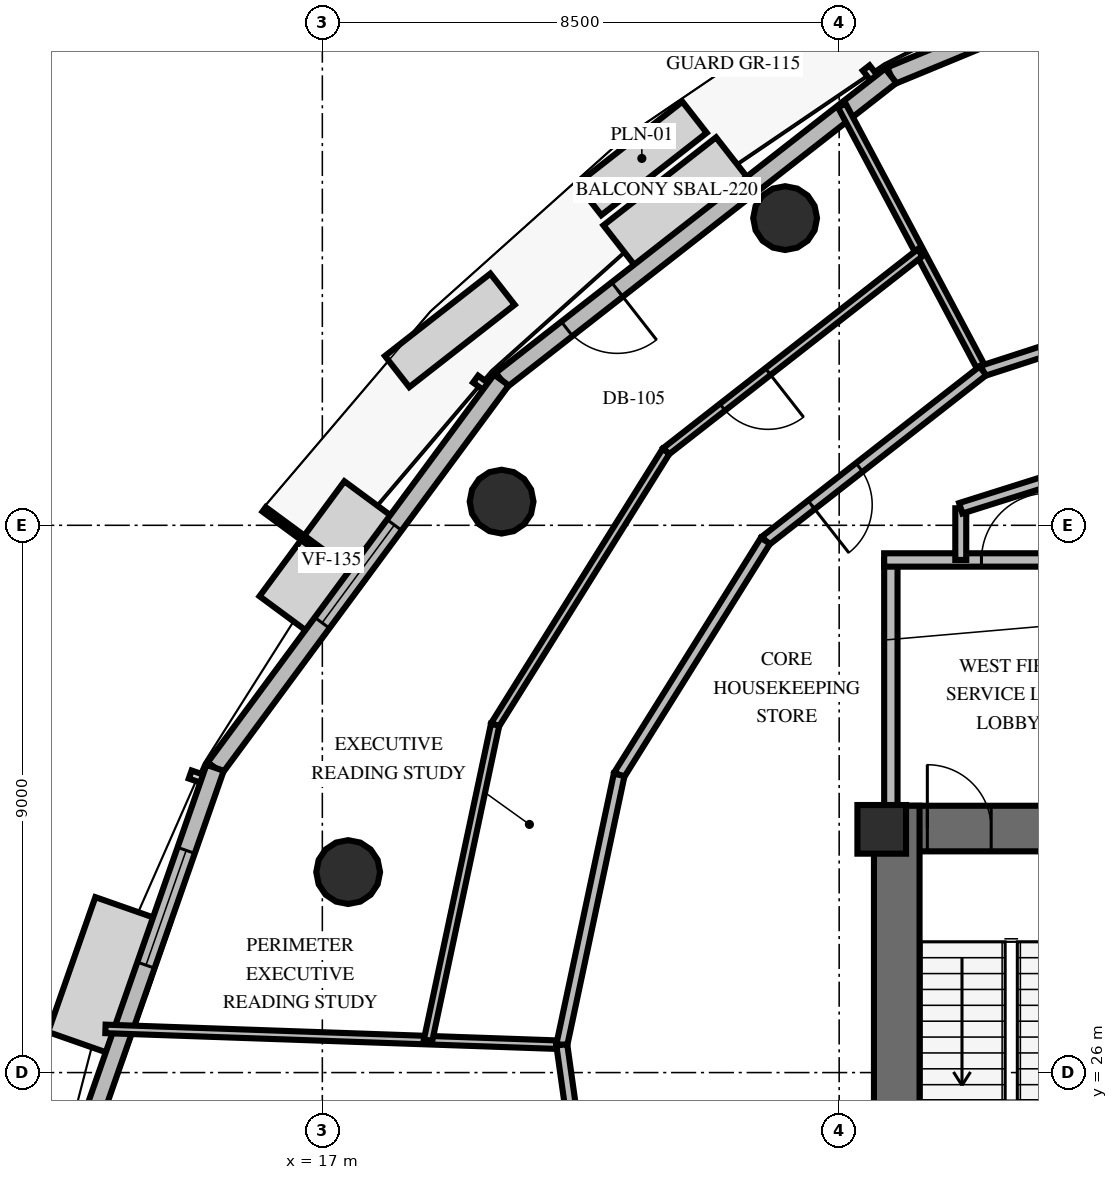
"""IFC4 building model, lengths in metres.
Left out: names, types, materials, properties, quantities, classifications, styles, units other than length and angle.
Written with IfcOpenShell. Run it as: python <this file> out.ifc"""

import sys

from ifc_helpers import new_model, si_unit, direction, frame, frame_2d, origin, origin_2d, place, context, subcontext, project, spatial, rectangle, circle, extrude, element, fill, save


model = new_model("IFC4")
c1 = context("Model", 3, precision=1e-05, world=origin(), true_north=direction((0.0, 1.0)))
c2 = subcontext(c1, "Body", "Model", "MODEL_VIEW")
j1 = project(units=[si_unit("LENGTHUNIT", "METRE"), si_unit("PLANEANGLEUNIT", "RADIAN")], contexts=[c1])
p1 = place(None, origin())
s1 = spatial("IfcSite", under=j1, at=p1, CompositionType="ELEMENT")
p2 = place(p1, origin())
s2 = spatial("IfcBuilding", under=s1, at=p2, CompositionType="ELEMENT")
p3 = place(p2, frame((0.0, 0.0, 191.6)))
s3 = spatial("IfcBuildingStorey", under=s2, at=p3, CompositionType="ELEMENT", Elevation=191.6)
p4 = place(p3, frame((26.072, 30.013, 0.0), z_axis=(0.0, 0.0, 1.0), x_axis=(1.0, 0.0, 0.0)))
e1 = element("IfcWall", 1, at=p4, inside=s3, PredefinedType="SHEAR", context=c2, shape_type="SweptSolid", body=[
    extrude(rectangle(XDim=15.866, YDim=0.75, at=frame_2d((7.933, 0.0))), origin(), (0.0, 0.0, 1.0), 3.6),
])
p5 = place(p4, frame((0.878, 0.0, 0.0)))
e2 = element("IfcOpeningElement", 2, at=p5, cuts=e1, PredefinedType="OPENING", context=c2, shape_type="SweptSolid", body=[
    extrude(rectangle(XDim=1.05, YDim=2.15, at=frame_2d((0.525, 1.075))), frame((0.0, 0.385, 0.0), z_axis=(0.0, -1.0, 0.0), x_axis=(1.0, 0.0, 0.0)), (0.0, 0.0, 1.0), 0.77),
])
p6 = place(p4, frame((13.928, 0.0, 0.0)))
e3 = element("IfcOpeningElement", 3, at=p6, cuts=e1, PredefinedType="OPENING", context=c2, shape_type="SweptSolid", body=[
    extrude(rectangle(XDim=1.05, YDim=2.15, at=frame_2d((0.525, 1.075))), frame((0.0, 0.385, 0.0), z_axis=(0.0, -1.0, 0.0), x_axis=(1.0, 0.0, 0.0)), (0.0, 0.0, 1.0), 0.77),
])
p7 = place(p4, frame((7.378, 0.0, 0.0)))
e4 = element("IfcOpeningElement", 4, at=p7, cuts=e1, PredefinedType="OPENING", context=c2, shape_type="SweptSolid", body=[
    extrude(rectangle(XDim=1.1, YDim=2.15, at=frame_2d((0.55, 1.075))), frame((0.0, 0.385, 0.0), z_axis=(0.0, -1.0, 0.0), x_axis=(1.0, 0.0, 0.0)), (0.0, 0.0, 1.0), 0.77),
])
p8 = place(p3, frame((26.447, 19.812, 0.0), z_axis=(0.0, 0.0, 1.0), x_axis=(0.0, 1.0, 0.0)))
e5 = element("IfcWall", 5, at=p8, inside=s3, PredefinedType="SHEAR", context=c2, shape_type="SweptSolid", body=[
    extrude(rectangle(XDim=10.576, YDim=0.75, at=frame_2d((5.288, 0.0))), origin(), (0.0, 0.0, 1.0), 3.6),
])
p9 = place(p3, frame((26.2, 30.0, 0.0), z_axis=(0.0, 0.0, 1.0), x_axis=(1.0, 0.0, 0.0)))
e6 = element("IfcColumn", 6, at=p9, inside=s3, PredefinedType="PILASTER", context=c2, shape_type="SweptSolid", body=[
    extrude(rectangle(XDim=0.8, YDim=0.8, at=origin_2d()), origin(), (0.0, 0.0, 1.0), 3.6),
])
for number, where, z_axis, x_axis in (
    (7, (24.611, 40.052, 0.0), (0.0, 0.0, 1.0), (1.0, 0.0, 0.0)),
    (8, (19.948, 35.389, 0.0), (0.0, 0.0, 1.0), (1.0, 0.0, 0.0)),
    (9, (17.425, 29.297, 0.0), (0.0, 0.0, 1.0), (1.0, 0.0, 0.0)),
):
    element("IfcColumn", number, at=place(p3, frame(where, z_axis=z_axis, x_axis=x_axis)), inside=s3, PredefinedType="COLUMN", context=c2, shape_type="SweptSolid", body=[
        extrude(circle(Radius=0.525, at=origin_2d()), origin(), (0.0, 0.0, 1.0), 3.6),
    ])
p10 = place(p3, frame((33.676, 45.419, 0.0), z_axis=(0.0, 0.0, 1.0), x_axis=(-0.924266151276, -0.381748715264, 0.0)))
e10 = element("IfcWall", 10, at=p10, inside=s3, PredefinedType="SOLIDWALL", context=c2, shape_type="SweptSolid", body=[
    extrude(rectangle(XDim=7.927, YDim=0.3, at=frame_2d((3.963, 0.0))), origin(), (0.0, 0.0, 1.0), 2.66),
])
p11 = place(p10, frame((2.964, 0.0, 0.8)))
e11 = element("IfcOpeningElement", 11, at=p11, cuts=e10, PredefinedType="OPENING", context=c2, shape_type="SweptSolid", body=[
    extrude(rectangle(XDim=2.0, YDim=1.85, at=frame_2d((1.0, 0.925))), frame((0.0, 0.16, 0.0), z_axis=(0.0, -1.0, 0.0), x_axis=(1.0, 0.0, 0.0)), (0.0, 0.0, 1.0), 0.32),
])
p12 = place(p3, frame((26.349, 42.393, 0.0), z_axis=(0.0, 0.0, 1.0), x_axis=(-0.788009343807, -0.615663279783, 0.0)))
e12 = element("IfcWall", 12, at=p12, inside=s3, PredefinedType="SOLIDWALL", context=c2, shape_type="SweptSolid", body=[
    extrude(rectangle(XDim=8.127, YDim=0.3, at=frame_2d((4.063, 0.0))), origin(), (0.0, 0.0, 1.0), 2.66),
])
p13 = place(p12, frame((5.71, 0.0, 0.0)))
e13 = element("IfcOpeningElement", 13, at=p13, cuts=e12, PredefinedType="OPENING", context=c2, shape_type="SweptSolid", body=[
    extrude(rectangle(XDim=1.05, YDim=2.15, at=frame_2d((0.525, 1.075))), frame((0.0, 0.16, 0.0), z_axis=(0.0, -1.0, 0.0), x_axis=(1.0, 0.0, 0.0)), (0.0, 0.0, 1.0), 0.32),
])
p14 = place(p3, frame((19.945, 37.389, 0.0), z_axis=(0.0, 0.0, 1.0), x_axis=(-0.594010832638, -0.804457040934, 0.0)))
e14 = element("IfcWall", 14, at=p14, inside=s3, PredefinedType="SOLIDWALL", context=c2, shape_type="SweptSolid", body=[
    extrude(rectangle(XDim=7.927, YDim=0.3, at=frame_2d((3.963, 0.0))), origin(), (0.0, 0.0, 1.0), 2.66),
])
p15 = place(p14, frame((2.964, 0.0, 0.8)))
e15 = element("IfcOpeningElement", 15, at=p15, cuts=e14, PredefinedType="OPENING", context=c2, shape_type="SweptSolid", body=[
    extrude(rectangle(XDim=2.0, YDim=1.85, at=frame_2d((1.0, 0.925))), frame((0.0, 0.16, 0.0), z_axis=(0.0, -1.0, 0.0), x_axis=(1.0, 0.0, 0.0)), (0.0, 0.0, 1.0), 0.32),
])
p16 = place(p3, frame((15.236, 31.012, 0.0), z_axis=(0.0, 0.0, 1.0), x_axis=(-0.330587092265, -0.943775489419, 0.0)))
e16 = element("IfcWall", 16, at=p16, inside=s3, PredefinedType="SOLIDWALL", context=c2, shape_type="SweptSolid", body=[
    extrude(rectangle(XDim=7.398, YDim=0.3, at=frame_2d((3.699, 0.0))), origin(), (0.0, 0.0, 1.0), 2.66),
])
p17 = place(p16, frame((1.439, 0.0, 0.8)))
e17 = element("IfcOpeningElement", 17, at=p17, cuts=e16, PredefinedType="OPENING", context=c2, shape_type="SweptSolid", body=[
    extrude(rectangle(XDim=2.0, YDim=1.85, at=frame_2d((1.0, 0.925))), frame((0.0, 0.16, 0.0), z_axis=(0.0, -1.0, 0.0), x_axis=(1.0, 0.0, 0.0)), (0.0, 0.0, 1.0), 0.32),
])
p18 = place(p3, frame((26.35, 30.05, 0.0), z_axis=(0.0, 0.0, 1.0), x_axis=(0.0, 1.0, 0.0)))
e18 = element("IfcWall", 18, at=p18, inside=s3, PredefinedType="SOLIDWALL", context=c2, shape_type="SweptSolid", body=[
    extrude(rectangle(XDim=4.38, YDim=0.22, at=frame_2d((2.19, 0.0))), origin(), (0.0, 0.0, 1.0), 2.46),
])
p19 = place(p3, frame((26.24, 34.43, 0.0), z_axis=(0.0, 0.0, 1.0), x_axis=(1.0, 0.0, 0.0)))
e19 = element("IfcWall", 19, at=p19, inside=s3, PredefinedType="SOLIDWALL", context=c2, shape_type="SweptSolid", body=[
    extrude(rectangle(XDim=4.31, YDim=0.22, at=frame_2d((2.155, 0.0))), origin(), (0.0, 0.0, 1.0), 2.46),
])
p20 = place(p19, frame((1.6, 0.0, 0.0)))
e20 = element("IfcOpeningElement", 20, at=p20, cuts=e19, PredefinedType="OPENING", context=c2, shape_type="SweptSolid", body=[
    extrude(rectangle(XDim=1.1, YDim=2.15, at=frame_2d((0.55, 1.075))), frame((0.0, 0.12, 0.0), z_axis=(0.0, -1.0, 0.0), x_axis=(1.0, 0.0, 0.0)), (0.0, 0.0, 1.0), 0.24),
])
p21 = place(p3, frame((27.5, 34.43, 0.0), z_axis=(0.0, 0.0, 1.0), x_axis=(0.0, 1.0, 0.0)))
e21 = element("IfcWall", 21, at=p21, inside=s3, PredefinedType="PARTITIONING", context=c2, shape_type="SweptSolid", body=[
    extrude(rectangle(XDim=0.85, YDim=0.18, at=frame_2d((0.425, 0.0))), origin(), (0.0, 0.0, 1.0), 2.46),
])
p22 = place(p3, frame((27.5, 35.28, 0.0), z_axis=(0.0, 0.0, 1.0), x_axis=(0.953691418528, 0.300786765376, 0.0)))
e22 = element("IfcWall", 22, at=p22, inside=s3, PredefinedType="PARTITIONING", context=c2, shape_type="SweptSolid", body=[
    extrude(rectangle(XDim=6.816, YDim=0.18, at=frame_2d((3.408, 0.0))), origin(), (0.0, 0.0, 1.0), 2.46),
])
p23 = place(p22, frame((2.858, 0.0, 0.0)))
e23 = element("IfcOpeningElement", 23, at=p23, cuts=e22, PredefinedType="OPENING", context=c2, shape_type="SweptSolid", body=[
    extrude(rectangle(XDim=1.1, YDim=2.15, at=frame_2d((0.55, 1.075))), frame((0.0, 0.1, 0.0), z_axis=(0.0, -1.0, 0.0), x_axis=(1.0, 0.0, 0.0)), (0.0, 0.0, 1.0), 0.2),
])
p24 = place(p3, frame((27.864, 37.54, 0.0), z_axis=(0.0, 0.0, 1.0), x_axis=(-0.469457334857, 0.882955157836, 0.0)))
e24 = element("IfcWall", 24, at=p24, inside=s3, PredefinedType="PARTITIONING", context=c2, shape_type="SweptSolid", body=[
    extrude(rectangle(XDim=4.943, YDim=0.14, at=frame_2d((2.472, 0.0))), origin(), (0.0, 0.0, 1.0), 2.46),
])
p25 = place(p3, frame((32.181, 38.943, 0.0), z_axis=(0.0, 0.0, 1.0), x_axis=(-0.951044345013, -0.309054451219, 0.0)))
e25 = element("IfcWall", 25, at=p25, inside=s3, PredefinedType="PARTITIONING", context=c2, shape_type="SweptSolid", body=[
    extrude(rectangle(XDim=4.539, YDim=0.18, at=frame_2d((2.27, 0.0))), origin(), (0.0, 0.0, 1.0), 2.46),
])
p26 = place(p3, frame((20.938, 26.456, 0.0), z_axis=(0.0, 0.0, 1.0), x_axis=(-0.999390219597, 0.034916886657, 0.0)))
e26 = element("IfcWall", 26, at=p26, inside=s3, PredefinedType="PARTITIONING", context=c2, shape_type="SweptSolid", body=[
    extrude(rectangle(XDim=7.51, YDim=0.14, at=frame_2d((3.755, 0.0))), origin(), (0.0, 0.0, 1.0), 2.46),
])
p27 = place(p3, frame((27.864, 37.54, 0.0), z_axis=(0.0, 0.0, 1.0), x_axis=(-0.788026820044, -0.61564091067, 0.0)))
e27 = element("IfcWall", 27, at=p27, inside=s3, PredefinedType="PARTITIONING", context=c2, shape_type="SweptSolid", body=[
    extrude(rectangle(XDim=4.539, YDim=0.18, at=frame_2d((2.27, 0.0))), origin(), (0.0, 0.0, 1.0), 2.46),
])
p28 = place(p27, frame((2.579, 0.0, 0.0)))
e28 = element("IfcOpeningElement", 28, at=p28, cuts=e27, PredefinedType="OPENING", context=c2, shape_type="SweptSolid", body=[
    extrude(rectangle(XDim=1.0, YDim=2.15, at=frame_2d((0.5, 1.075))), frame((0.0, 0.1, 0.0), z_axis=(0.0, -1.0, 0.0), x_axis=(1.0, 0.0, 0.0)), (0.0, 0.0, 1.0), 0.2),
])
p29 = place(p3, frame((24.287, 34.746, 0.0), z_axis=(0.0, 0.0, 1.0), x_axis=(-0.529921587304, -0.848046644536, 0.0)))
e29 = element("IfcWall", 29, at=p29, inside=s3, PredefinedType="PARTITIONING", context=c2, shape_type="SweptSolid", body=[
    extrude(rectangle(XDim=4.539, YDim=0.18, at=frame_2d((2.27, 0.0))), origin(), (0.0, 0.0, 1.0), 2.46),
])
p30 = place(p3, frame((21.882, 30.896, 0.0), z_axis=(0.0, 0.0, 1.0), x_axis=(-0.207883200318, -0.978153656143, 0.0)))
e30 = element("IfcWall", 30, at=p30, inside=s3, PredefinedType="PARTITIONING", context=c2, shape_type="SweptSolid", body=[
    extrude(rectangle(XDim=4.539, YDim=0.18, at=frame_2d((2.27, 0.0))), origin(), (0.0, 0.0, 1.0), 2.46),
])
p31 = place(p3, frame((26.831, 39.483, 0.0), z_axis=(0.0, 0.0, 1.0), x_axis=(-0.788011811191, -0.615660121677, 0.0)))
e31 = element("IfcWall", 31, at=p31, inside=s3, PredefinedType="PARTITIONING", context=c2, shape_type="SweptSolid", body=[
    extrude(rectangle(XDim=5.303, YDim=0.14, at=frame_2d((2.652, 0.0))), origin(), (0.0, 0.0, 1.0), 2.46),
])
p32 = place(p31, frame((3.175, 0.0, 0.0)))
e32 = element("IfcOpeningElement", 32, at=p32, cuts=e31, PredefinedType="OPENING", context=c2, shape_type="SweptSolid", body=[
    extrude(rectangle(XDim=0.95, YDim=2.15, at=frame_2d((0.475, 1.075))), frame((0.0, 0.08, 0.0), z_axis=(0.0, -1.0, 0.0), x_axis=(1.0, 0.0, 0.0)), (0.0, 0.0, 1.0), 0.16),
])
for number, where, z_axis, x_axis in (
    (33, (22.652, 36.218, 0.0), (0.0, 0.0, 1.0), (-0.53, -0.848, 0.0)),
    (34, (19.842, 31.72, 0.0), (0.0, 0.0, 1.0), (-0.208, -0.978, 0.0)),
):
    element("IfcWall", number, at=place(p3, frame(where, z_axis=z_axis, x_axis=x_axis)), inside=s3, PredefinedType="PARTITIONING", context=c2, shape_type="SweptSolid", body=[
        extrude(rectangle(XDim=5.303, YDim=0.14, at=frame_2d((2.652, 0.0))), origin(), (0.0, 0.0, 1.0), 2.46),
    ])
p33 = place(p3, frame((20.938, 26.456, 0.0), z_axis=(0.0, 0.0, 1.0), x_axis=(0.13914687034, -0.990271754861, 0.0)))
e35 = element("IfcWall", 35, at=p33, inside=s3, PredefinedType="PARTITIONING", context=c2, shape_type="SweptSolid", body=[
    extrude(rectangle(XDim=4.539, YDim=0.18, at=frame_2d((2.27, 0.0))), origin(), (0.0, 0.0, 1.0), 2.46),
])
p34 = place(p13, origin())
e36 = element("IfcDoor", 36, at=p34, inside=s3, OperationType="SINGLE_SWING_LEFT", PredefinedType="DOOR", context=c2, shape_type="SweptSolid", body=[
    extrude(rectangle(XDim=1.05, YDim=2.15, at=frame_2d((0.525, 1.075))), frame((0.0, 0.025, 0.0), z_axis=(0.0, -1.0, 0.0), x_axis=(1.0, 0.0, 0.0)), (0.0, 0.0, 1.0), 0.05),
])
fill(e13, e36)
p35 = place(p15, origin())
e37 = element("IfcWindow", 37, at=p35, inside=s3, PartitioningType="SINGLE_PANEL", PredefinedType="WINDOW", context=c2, shape_type="SweptSolid", body=[
    extrude(rectangle(XDim=2.0, YDim=1.85, at=frame_2d((1.0, 0.925))), frame((0.0, 0.03, 0.0), z_axis=(0.0, -1.0, 0.0), x_axis=(1.0, 0.0, 0.0)), (0.0, 0.0, 1.0), 0.06),
])
fill(e15, e37)
p36 = place(p17, origin())
e38 = element("IfcWindow", 38, at=p36, inside=s3, PartitioningType="SINGLE_PANEL", PredefinedType="WINDOW", context=c2, shape_type="SweptSolid", body=[
    extrude(rectangle(XDim=2.0, YDim=1.85, at=frame_2d((1.0, 0.925))), frame((0.0, 0.03, 0.0), z_axis=(0.0, -1.0, 0.0), x_axis=(1.0, 0.0, 0.0)), (0.0, 0.0, 1.0), 0.06),
])
fill(e17, e38)
p37 = place(p5, origin())
e39 = element("IfcDoor", 39, at=p37, inside=s3, OperationType="SINGLE_SWING_LEFT", PredefinedType="DOOR", context=c2, shape_type="SweptSolid", body=[
    extrude(rectangle(XDim=1.05, YDim=2.15, at=frame_2d((0.525, 1.075))), frame((0.0, 0.025, 0.0), z_axis=(0.0, -1.0, 0.0), x_axis=(1.0, 0.0, 0.0)), (0.0, 0.0, 1.0), 0.05),
])
fill(e2, e39)
p38 = place(p20, origin())
e40 = element("IfcDoor", 40, at=p38, inside=s3, OperationType="SINGLE_SWING_RIGHT", PredefinedType="DOOR", context=c2, shape_type="SweptSolid", body=[
    extrude(rectangle(XDim=1.1, YDim=2.15, at=frame_2d((0.55, 1.075))), frame((0.0, 0.025, 0.0), z_axis=(0.0, -1.0, 0.0), x_axis=(1.0, 0.0, 0.0)), (0.0, 0.0, 1.0), 0.05),
])
fill(e20, e40)
p39 = place(p28, origin())
e41 = element("IfcDoor", 41, at=p39, inside=s3, OperationType="SINGLE_SWING_RIGHT", PredefinedType="DOOR", context=c2, shape_type="SweptSolid", body=[
    extrude(rectangle(XDim=1.0, YDim=2.15, at=frame_2d((0.5, 1.075))), frame((0.0, 0.025, 0.0), z_axis=(0.0, -1.0, 0.0), x_axis=(1.0, 0.0, 0.0)), (0.0, 0.0, 1.0), 0.05),
])
fill(e28, e41)
p40 = place(p32, origin())
e42 = element("IfcDoor", 42, at=p40, inside=s3, OperationType="SINGLE_SWING_LEFT", PredefinedType="DOOR", context=c2, shape_type="SweptSolid", body=[
    extrude(rectangle(XDim=0.95, YDim=2.15, at=frame_2d((0.475, 1.075))), frame((0.0, 0.025, 0.0), z_axis=(0.0, -1.0, 0.0), x_axis=(1.0, 0.0, 0.0)), (0.0, 0.0, 1.0), 0.05),
])
fill(e32, e42)
save(model, sys.argv[1])
